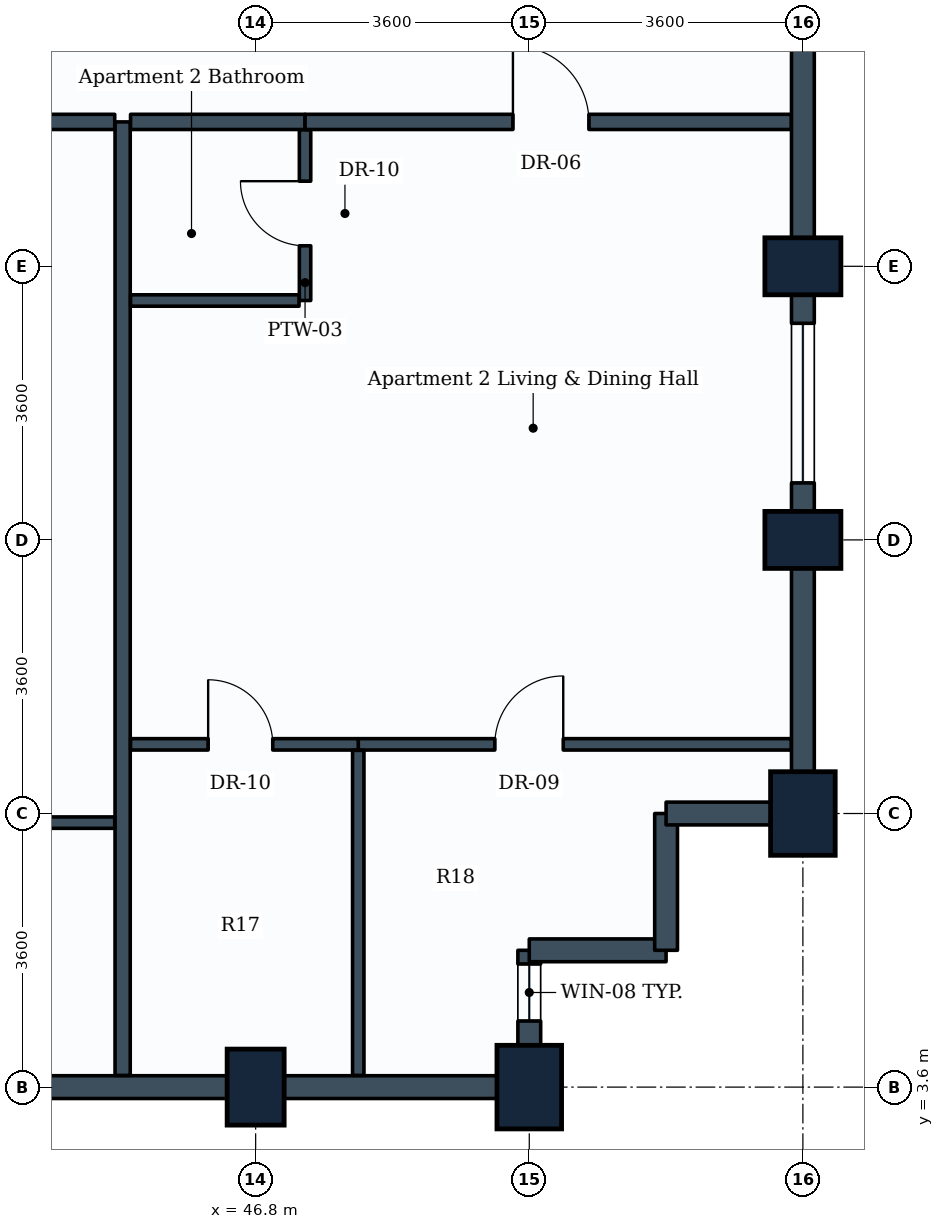
"""IFC4 building model, lengths in metres.
Left out: names, types, materials, properties, quantities, classifications, styles, units other than length and angle.
Written with IfcOpenShell. Run it as: python <this file> out.ifc"""

import sys

from ifc_helpers import new_model, si_unit, direction, frame, frame_2d, origin, origin_2d, place, context, subcontext, project, spatial, rectangle, extrude, element, fill, save


model = new_model("IFC4")
c1 = context("Model", 3, precision=1e-05, world=origin(), true_north=direction((0.0, 1.0)))
c2 = subcontext(c1, "Body", "Model", "MODEL_VIEW")
j1 = project(units=[si_unit("LENGTHUNIT", "METRE"), si_unit("PLANEANGLEUNIT", "RADIAN")], contexts=[c1])
p1 = place(None, origin())
s1 = spatial("IfcSite", under=j1, at=p1, CompositionType="ELEMENT")
p2 = place(p1, origin())
s2 = spatial("IfcBuilding", under=s1, at=p2, CompositionType="ELEMENT")
p3 = place(p2, frame((0.0, 0.0, 154.2)))
s3 = spatial("IfcBuildingStorey", under=s2, at=p3, CompositionType="ELEMENT", Elevation=154.2)
p4 = place(p3, frame((46.8, 3.6, 0.0), z_axis=(0.0, 0.0, 1.0), x_axis=(1.0, 0.0, 0.0)))
e1 = element("IfcColumn", 1, at=p4, inside=s3, PredefinedType="COLUMN", context=c2, shape_type="SweptSolid", body=[
    extrude(rectangle(XDim=0.75, YDim=1.0, at=origin_2d()), origin(), (0.0, 0.0, 1.0), 3.8),
])
for number, where, z_axis, x_axis in (
    (2, (50.4, 3.6, 0.0), (0.0, 0.0, 1.0), (1.0, 0.0, 0.0)),
    (3, (54.0, 7.2, 0.0), (0.0, 0.0, 1.0), (1.0, 0.0, 0.0)),
):
    element("IfcColumn", number, at=place(p3, frame(where, z_axis=z_axis, x_axis=x_axis)), inside=s3, PredefinedType="COLUMN", context=c2, shape_type="SweptSolid", body=[
        extrude(rectangle(XDim=0.85, YDim=1.1, at=origin_2d()), origin(), (0.0, 0.0, 1.0), 3.8),
    ])
for number, where, z_axis, x_axis in (
    (4, (54.0, 10.8, 0.0), (0.0, 0.0, 1.0), (0.0, 1.0, 0.0)),
    (5, (54.0, 14.4, 0.0), (0.0, 0.0, 1.0), (0.0, 1.0, 0.0)),
):
    element("IfcColumn", number, at=place(p3, frame(where, z_axis=z_axis, x_axis=x_axis)), inside=s3, PredefinedType="COLUMN", context=c2, shape_type="SweptSolid", body=[
        extrude(rectangle(XDim=0.75, YDim=1.0, at=origin_2d()), origin(), (0.0, 0.0, 1.0), 3.8),
    ])
p5 = place(p3, frame((46.8, 3.6, 0.0), z_axis=(0.0, 0.0, 1.0), x_axis=(-1.0, 0.0, 0.0)))
e6 = element("IfcWall", 6, at=p5, inside=s3, PredefinedType="STANDARD", context=c2, shape_type="SweptSolid", body=[
    extrude(rectangle(XDim=3.6, YDim=0.3, at=frame_2d((1.8, 0.0))), origin(), (0.0, 0.0, 1.0), 2.93),
])
p6 = place(p3, frame((50.4, 3.6, 0.0), z_axis=(0.0, 0.0, 1.0), x_axis=(-1.0, 0.0, 0.0)))
e7 = element("IfcWall", 7, at=p6, inside=s3, PredefinedType="STANDARD", context=c2, shape_type="SweptSolid", body=[
    extrude(rectangle(XDim=3.6, YDim=0.3, at=frame_2d((1.8, 0.0))), origin(), (0.0, 0.0, 1.0), 2.93),
])
p7 = place(p3, frame((50.4, 5.4, 0.0), z_axis=(0.0, 0.0, 1.0), x_axis=(0.0, -1.0, 0.0)))
e8 = element("IfcWall", 8, at=p7, inside=s3, PredefinedType="STANDARD", context=c2, shape_type="SweptSolid", body=[
    extrude(rectangle(XDim=1.8, YDim=0.3, at=frame_2d((0.9, 0.0))), origin(), (0.0, 0.0, 1.0), 2.93),
])
p8 = place(p7, frame((0.18, 0.0, 0.85)))
e9 = element("IfcOpeningElement", 9, at=p8, cuts=e8, PredefinedType="OPENING", context=c2, shape_type="SweptSolid", body=[
    extrude(rectangle(XDim=0.75, YDim=1.05, at=frame_2d((0.375, 0.525))), frame((0.0, 0.16, 0.0), z_axis=(0.0, -1.0, 0.0), x_axis=(1.0, 0.0, 0.0)), (0.0, 0.0, 1.0), 0.32),
])
for number, where, z_axis, x_axis in (
    (10, (52.2, 5.4, 0.0), (0.0, 0.0, 1.0), (-1.0, 0.0, 0.0)),
    (11, (52.2, 7.2, 0.0), (0.0, 0.0, 1.0), (0.0, -1.0, 0.0)),
):
    element("IfcWall", number, at=place(p3, frame(where, z_axis=z_axis, x_axis=x_axis)), inside=s3, PredefinedType="STANDARD", context=c2, shape_type="SweptSolid", body=[
        extrude(rectangle(XDim=1.8, YDim=0.3, at=frame_2d((0.9, 0.0))), origin(), (0.0, 0.0, 1.0), 3.535),
    ])
p9 = place(p3, frame((54.0, 7.2, 0.0), z_axis=(0.0, 0.0, 1.0), x_axis=(-1.0, 0.0, 0.0)))
e12 = element("IfcWall", 12, at=p9, inside=s3, PredefinedType="STANDARD", context=c2, shape_type="SweptSolid", body=[
    extrude(rectangle(XDim=1.8, YDim=0.3, at=frame_2d((0.9, 0.0))), origin(), (0.0, 0.0, 1.0), 2.93),
])
p10 = place(p3, frame((54.0, 10.8, 0.0), z_axis=(0.0, 0.0, 1.0), x_axis=(0.0, -1.0, 0.0)))
e13 = element("IfcWall", 13, at=p10, inside=s3, PredefinedType="STANDARD", context=c2, shape_type="SweptSolid", body=[
    extrude(rectangle(XDim=3.6, YDim=0.3, at=frame_2d((1.8, 0.0))), origin(), (0.0, 0.0, 1.0), 2.93),
])
p11 = place(p3, frame((54.0, 14.4, 0.0), z_axis=(0.0, 0.0, 1.0), x_axis=(0.0, -1.0, 0.0)))
e14 = element("IfcWall", 14, at=p11, inside=s3, PredefinedType="STANDARD", context=c2, shape_type="SweptSolid", body=[
    extrude(rectangle(XDim=3.6, YDim=0.3, at=frame_2d((1.8, 0.0))), origin(), (0.0, 0.0, 1.0), 2.93),
])
p12 = place(p11, frame((0.75, 0.0, 0.85)))
e15 = element("IfcOpeningElement", 15, at=p12, cuts=e14, PredefinedType="OPENING", context=c2, shape_type="SweptSolid", body=[
    extrude(rectangle(XDim=2.1, YDim=1.35, at=frame_2d((1.05, 0.675))), frame((0.0, 0.16, 0.0), z_axis=(0.0, -1.0, 0.0), x_axis=(1.0, 0.0, 0.0)), (0.0, 0.0, 1.0), 0.32),
])
p13 = place(p3, frame((54.0, 18.0, 0.0), z_axis=(0.0, 0.0, 1.0), x_axis=(0.0, -1.0, 0.0)))
e16 = element("IfcWall", 16, at=p13, inside=s3, PredefinedType="STANDARD", context=c2, shape_type="SweptSolid", body=[
    extrude(rectangle(XDim=3.6, YDim=0.3, at=frame_2d((1.8, 0.0))), origin(), (0.0, 0.0, 1.0), 2.93),
])
p14 = place(p3, frame((45.05, 3.754, 0.0), z_axis=(0.0, 0.0, 1.0), x_axis=(0.0, 1.0, 0.0)))
e17 = element("IfcWall", 17, at=p14, inside=s3, PredefinedType="PARTITIONING", context=c2, shape_type="SweptSolid", body=[
    extrude(rectangle(XDim=12.546, YDim=0.2, at=frame_2d((6.273, 0.0))), origin(), (0.0, 0.0, 1.0), 2.93),
])
p15 = place(p3, frame((36.8, 16.3, 0.0), z_axis=(0.0, 0.0, 1.0), x_axis=(1.0, 0.0, 0.0)))
e18 = element("IfcWall", 18, at=p15, inside=s3, PredefinedType="PARTITIONING", context=c2, shape_type="SweptSolid", body=[
    extrude(rectangle(XDim=8.146, YDim=0.2, at=frame_2d((4.073, 0.0))), origin(), (0.0, 0.0, 1.0), 3.17),
])
p16 = place(p15, frame((2.829, 0.0, 0.0)))
e19 = element("IfcOpeningElement", 19, at=p16, cuts=e18, PredefinedType="OPENING", context=c2, shape_type="SweptSolid", body=[
    extrude(rectangle(XDim=1.0, YDim=2.1, at=frame_2d((0.5, 1.05))), frame((0.0, 0.11, 0.0), z_axis=(0.0, -1.0, 0.0), x_axis=(1.0, 0.0, 0.0)), (0.0, 0.0, 1.0), 0.22),
])
p17 = place(p3, frame((37.5, 7.08, 0.0), z_axis=(0.0, 0.0, 1.0), x_axis=(1.0, 0.0, 0.0)))
e20 = element("IfcWall", 20, at=p17, inside=s3, PredefinedType="PARTITIONING", context=c2, shape_type="SweptSolid", body=[
    extrude(rectangle(XDim=7.446, YDim=0.15, at=frame_2d((3.723, 0.0))), origin(), (0.0, 0.0, 1.0), 3.17),
])
p18 = place(p17, frame((3.285, 0.0, 0.0)))
e21 = element("IfcOpeningElement", 21, at=p18, cuts=e20, PredefinedType="OPENING", context=c2, shape_type="SweptSolid", body=[
    extrude(rectangle(XDim=0.9, YDim=2.1, at=frame_2d((0.45, 1.05))), frame((0.0, 0.085, 0.0), z_axis=(0.0, -1.0, 0.0), x_axis=(1.0, 0.0, 0.0)), (0.0, 0.0, 1.0), 0.17),
])
p19 = place(p3, frame((45.154, 16.3, 0.0), z_axis=(0.0, 0.0, 1.0), x_axis=(1.0, 0.0, 0.0)))
e22 = element("IfcWall", 22, at=p19, inside=s3, PredefinedType="PARTITIONING", context=c2, shape_type="SweptSolid", body=[
    extrude(rectangle(XDim=2.296, YDim=0.2, at=frame_2d((1.148, 0.0))), origin(), (0.0, 0.0, 1.0), 3.17),
])
p20 = place(p3, frame((47.45, 13.95, 0.0), z_axis=(0.0, 0.0, 1.0), x_axis=(0.0, 1.0, 0.0)))
e23 = element("IfcWall", 23, at=p20, inside=s3, PredefinedType="PARTITIONING", context=c2, shape_type="SweptSolid", body=[
    extrude(rectangle(XDim=2.246, YDim=0.15, at=frame_2d((1.123, 0.0))), origin(), (0.0, 0.0, 1.0), 3.17),
])
p21 = place(p20, frame((0.72, 0.0, 0.0)))
e24 = element("IfcOpeningElement", 24, at=p21, cuts=e23, PredefinedType="OPENING", context=c2, shape_type="SweptSolid", body=[
    extrude(rectangle(XDim=0.85, YDim=2.1, at=frame_2d((0.425, 1.05))), frame((0.0, 0.085, 0.0), z_axis=(0.0, -1.0, 0.0), x_axis=(1.0, 0.0, 0.0)), (0.0, 0.0, 1.0), 0.17),
])
p22 = place(p3, frame((45.154, 13.95, 0.0), z_axis=(0.0, 0.0, 1.0), x_axis=(1.0, 0.0, 0.0)))
e25 = element("IfcWall", 25, at=p22, inside=s3, PredefinedType="PARTITIONING", context=c2, shape_type="SweptSolid", body=[
    extrude(rectangle(XDim=2.217, YDim=0.15, at=frame_2d((1.108, 0.0))), origin(), (0.0, 0.0, 1.0), 3.17),
])
p23 = place(p3, frame((47.45, 16.3, 0.0), z_axis=(0.0, 0.0, 1.0), x_axis=(1.0, 0.0, 0.0)))
e26 = element("IfcWall", 26, at=p23, inside=s3, PredefinedType="PARTITIONING", context=c2, shape_type="SweptSolid", body=[
    extrude(rectangle(XDim=6.396, YDim=0.2, at=frame_2d((3.198, 0.0))), origin(), (0.0, 0.0, 1.0), 2.93),
])
p24 = place(p23, frame((2.735, 0.0, 0.0)))
e27 = element("IfcOpeningElement", 27, at=p24, cuts=e26, PredefinedType="OPENING", context=c2, shape_type="SweptSolid", body=[
    extrude(rectangle(XDim=1.0, YDim=2.1, at=frame_2d((0.5, 1.05))), frame((0.0, 0.11, 0.0), z_axis=(0.0, -1.0, 0.0), x_axis=(1.0, 0.0, 0.0)), (0.0, 0.0, 1.0), 0.22),
])
p25 = place(p3, frame((48.15, 8.11, 0.0), z_axis=(0.0, 0.0, 1.0), x_axis=(1.0, 0.0, 0.0)))
e28 = element("IfcWall", 28, at=p25, inside=s3, PredefinedType="PARTITIONING", context=c2, shape_type="SweptSolid", body=[
    extrude(rectangle(XDim=5.696, YDim=0.15, at=frame_2d((2.848, 0.0))), origin(), (0.0, 0.0, 1.0), 2.93),
])
p26 = place(p25, frame((1.797, 0.0, 0.0)))
e29 = element("IfcOpeningElement", 29, at=p26, cuts=e28, PredefinedType="OPENING", context=c2, shape_type="SweptSolid", body=[
    extrude(rectangle(XDim=0.9, YDim=2.1, at=frame_2d((0.45, 1.05))), frame((0.0, 0.085, 0.0), z_axis=(0.0, -1.0, 0.0), x_axis=(1.0, 0.0, 0.0)), (0.0, 0.0, 1.0), 0.17),
])
p27 = place(p3, frame((45.154, 8.11, 0.0), z_axis=(0.0, 0.0, 1.0), x_axis=(1.0, 0.0, 0.0)))
e30 = element("IfcWall", 30, at=p27, inside=s3, PredefinedType="PARTITIONING", context=c2, shape_type="SweptSolid", body=[
    extrude(rectangle(XDim=2.996, YDim=0.15, at=frame_2d((1.498, 0.0))), origin(), (0.0, 0.0, 1.0), 3.17),
])
p28 = place(p27, frame((1.021, 0.0, 0.0)))
e31 = element("IfcOpeningElement", 31, at=p28, cuts=e30, PredefinedType="OPENING", context=c2, shape_type="SweptSolid", body=[
    extrude(rectangle(XDim=0.85, YDim=2.1, at=frame_2d((0.425, 1.05))), frame((0.0, 0.085, 0.0), z_axis=(0.0, -1.0, 0.0), x_axis=(1.0, 0.0, 0.0)), (0.0, 0.0, 1.0), 0.17),
])
p29 = place(p3, frame((48.15, 3.754, 0.0), z_axis=(0.0, 0.0, 1.0), x_axis=(0.0, 1.0, 0.0)))
e32 = element("IfcWall", 32, at=p29, inside=s3, PredefinedType="PARTITIONING", context=c2, shape_type="SweptSolid", body=[
    extrude(rectangle(XDim=4.277, YDim=0.15, at=frame_2d((2.139, 0.0))), origin(), (0.0, 0.0, 1.0), 2.93),
])
p30 = place(p12, origin())
e33 = element("IfcWindow", 33, at=p30, inside=s3, PartitioningType="SINGLE_PANEL", PredefinedType="WINDOW", context=c2, shape_type="SweptSolid", body=[
    extrude(rectangle(XDim=2.1, YDim=1.35, at=frame_2d((1.05, 0.675))), frame((0.0, 0.03, 0.0), z_axis=(0.0, -1.0, 0.0), x_axis=(1.0, 0.0, 0.0)), (0.0, 0.0, 1.0), 0.06),
])
fill(e15, e33)
p31 = place(p21, origin())
e34 = element("IfcDoor", 34, at=p31, inside=s3, OperationType="SINGLE_SWING_RIGHT", PredefinedType="DOOR", context=c2, shape_type="SweptSolid", body=[
    extrude(rectangle(XDim=0.85, YDim=2.1, at=frame_2d((0.425, 1.05))), frame((0.0, 0.025, 0.0), z_axis=(0.0, -1.0, 0.0), x_axis=(1.0, 0.0, 0.0)), (0.0, 0.0, 1.0), 0.05),
])
fill(e24, e34)
p32 = place(p24, origin())
e35 = element("IfcDoor", 35, at=p32, inside=s3, OperationType="SINGLE_SWING_LEFT", PredefinedType="DOOR", context=c2, shape_type="SweptSolid", body=[
    extrude(rectangle(XDim=1.0, YDim=2.1, at=frame_2d((0.5, 1.05))), frame((0.0, 0.025, 0.0), z_axis=(0.0, -1.0, 0.0), x_axis=(1.0, 0.0, 0.0)), (0.0, 0.0, 1.0), 0.05),
])
fill(e27, e35)
p33 = place(p26, origin())
e36 = element("IfcDoor", 36, at=p33, inside=s3, OperationType="SINGLE_SWING_RIGHT", PredefinedType="DOOR", context=c2, shape_type="SweptSolid", body=[
    extrude(rectangle(XDim=0.9, YDim=2.1, at=frame_2d((0.45, 1.05))), frame((0.0, 0.025, 0.0), z_axis=(0.0, -1.0, 0.0), x_axis=(1.0, 0.0, 0.0)), (0.0, 0.0, 1.0), 0.05),
])
fill(e29, e36)
p34 = place(p28, origin())
e37 = element("IfcDoor", 37, at=p34, inside=s3, OperationType="SINGLE_SWING_LEFT", PredefinedType="DOOR", context=c2, shape_type="SweptSolid", body=[
    extrude(rectangle(XDim=0.85, YDim=2.1, at=frame_2d((0.425, 1.05))), frame((0.0, 0.025, 0.0), z_axis=(0.0, -1.0, 0.0), x_axis=(1.0, 0.0, 0.0)), (0.0, 0.0, 1.0), 0.05),
])
fill(e31, e37)
p35 = place(p8, origin())
e38 = element("IfcWindow", 38, at=p35, inside=s3, PartitioningType="SINGLE_PANEL", PredefinedType="WINDOW", context=c2, shape_type="SweptSolid", body=[
    extrude(rectangle(XDim=0.75, YDim=1.05, at=frame_2d((0.375, 0.525))), frame((0.0, 0.03, 0.0), z_axis=(0.0, -1.0, 0.0), x_axis=(1.0, 0.0, 0.0)), (0.0, 0.0, 1.0), 0.06),
])
fill(e9, e38)
save(model, sys.argv[1])
